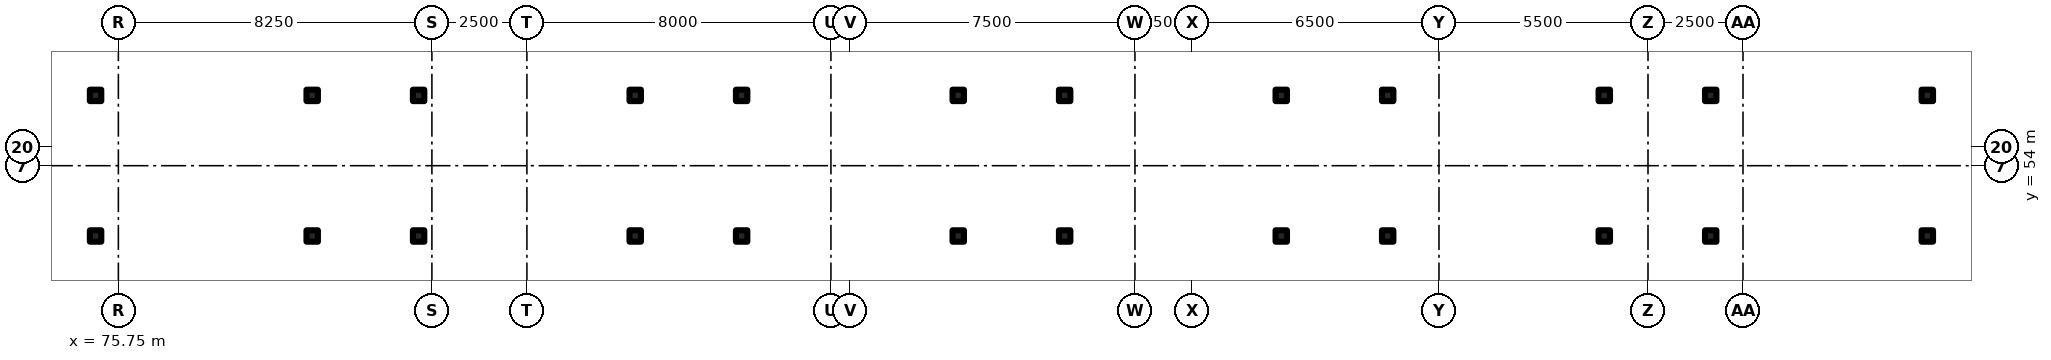
"""IFC4 building model, lengths in metres.
Left out: names, types, materials, properties, quantities, classifications, styles, units other than length and angle.
Written with IfcOpenShell. Run it as: python <this file> out.ifc"""

import sys

from ifc_helpers import new_model, si_unit, direction, frame, origin, origin_2d, place, context, subcontext, project, spatial, rectangle, extrude, element, save


model = new_model("IFC4")
c1 = context("Model", 3, precision=1e-05, world=origin(), true_north=direction((0.0, 1.0)))
c2 = subcontext(c1, "Body", "Model", "MODEL_VIEW")
j1 = project(units=[si_unit("LENGTHUNIT", "METRE"), si_unit("PLANEANGLEUNIT", "RADIAN")], contexts=[c1])
p1 = place(None, origin())
s1 = spatial("IfcSite", under=j1, at=p1, CompositionType="ELEMENT")
p2 = place(p1, origin())
s2 = spatial("IfcBuilding", under=s1, at=p2, CompositionType="ELEMENT")
p3 = place(p2, origin())
s3 = spatial("IfcBuildingStorey", under=s2, at=p3, CompositionType="ELEMENT", Elevation=0.0)
for number, where, z_axis, x_axis in (
    (1, (75.15, 52.15, -0.3), (0.0, 0.0, 1.0), (1.0, 0.0, 0.0)),
    (2, (80.85, 52.15, -0.3), (0.0, 0.0, 1.0), (1.0, 0.0, 0.0)),
    (3, (75.15, 55.85, -0.3), (0.0, 0.0, 1.0), (1.0, 0.0, 0.0)),
    (4, (80.85, 55.85, -0.3), (0.0, 0.0, 1.0), (1.0, 0.0, 0.0)),
    (5, (83.65, 52.15, -0.3), (0.0, 0.0, 1.0), (1.0, 0.0, 0.0)),
    (6, (89.35, 52.15, -0.3), (0.0, 0.0, 1.0), (1.0, 0.0, 0.0)),
    (7, (83.65, 55.85, -0.3), (0.0, 0.0, 1.0), (1.0, 0.0, 0.0)),
    (8, (89.35, 55.85, -0.3), (0.0, 0.0, 1.0), (1.0, 0.0, 0.0)),
    (9, (92.15, 52.15, -0.3), (0.0, 0.0, 1.0), (1.0, 0.0, 0.0)),
    (10, (97.85, 52.15, -0.3), (0.0, 0.0, 1.0), (1.0, 0.0, 0.0)),
    (11, (92.15, 55.85, -0.3), (0.0, 0.0, 1.0), (1.0, 0.0, 0.0)),
    (12, (97.85, 55.85, -0.3), (0.0, 0.0, 1.0), (1.0, 0.0, 0.0)),
    (13, (100.65, 52.15, -0.3), (0.0, 0.0, 1.0), (1.0, 0.0, 0.0)),
    (14, (106.35, 52.15, -0.3), (0.0, 0.0, 1.0), (1.0, 0.0, 0.0)),
    (15, (100.65, 55.85, -0.3), (0.0, 0.0, 1.0), (1.0, 0.0, 0.0)),
    (16, (106.35, 55.85, -0.3), (0.0, 0.0, 1.0), (1.0, 0.0, 0.0)),
    (17, (109.15, 52.15, -0.3), (0.0, 0.0, 1.0), (1.0, 0.0, 0.0)),
    (18, (114.85, 52.15, -0.3), (0.0, 0.0, 1.0), (1.0, 0.0, 0.0)),
    (19, (109.15, 55.85, -0.3), (0.0, 0.0, 1.0), (1.0, 0.0, 0.0)),
    (20, (114.85, 55.85, -0.3), (0.0, 0.0, 1.0), (1.0, 0.0, 0.0)),
    (21, (117.65, 52.15, -0.3), (0.0, 0.0, 1.0), (1.0, 0.0, 0.0)),
    (22, (123.35, 52.15, -0.3), (0.0, 0.0, 1.0), (1.0, 0.0, 0.0)),
    (23, (117.65, 55.85, -0.3), (0.0, 0.0, 1.0), (1.0, 0.0, 0.0)),
    (24, (123.35, 55.85, -0.3), (0.0, 0.0, 1.0), (1.0, 0.0, 0.0)),
):
    element("IfcColumn", number, at=place(p3, frame(where, z_axis=z_axis, x_axis=x_axis)), inside=s3, PredefinedType="COLUMN", context=c2, shape_type="SweptSolid", body=[
        extrude(rectangle(XDim=0.3, YDim=0.3, at=origin_2d()), origin(), (0.0, 0.0, 1.0), 3.65),
    ])
save(model, sys.argv[1])
